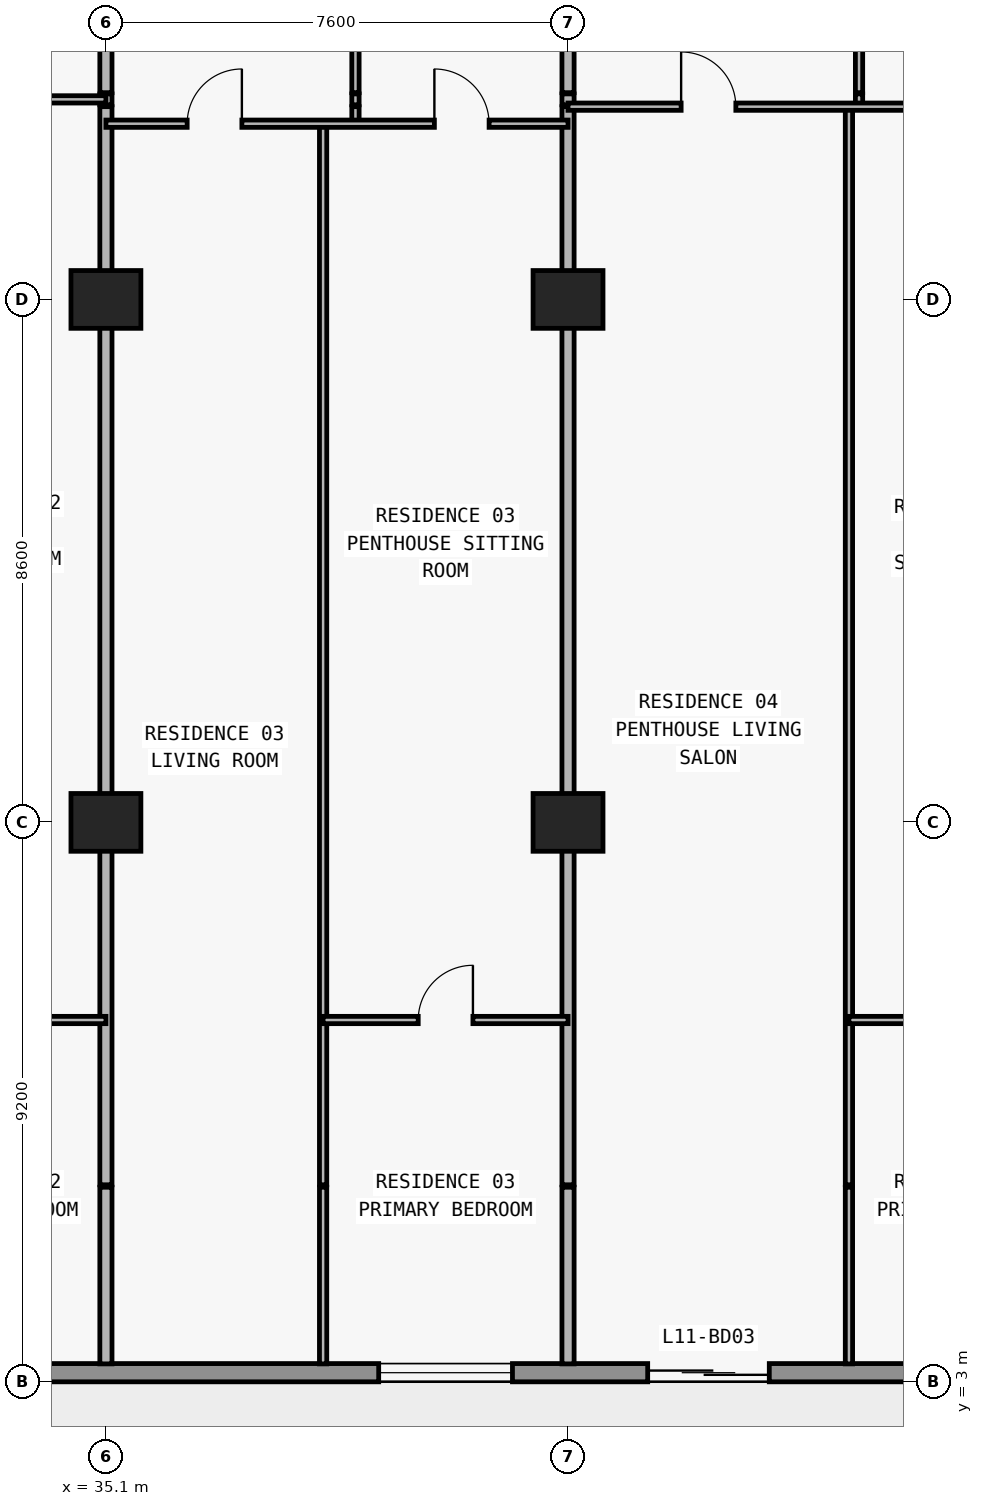
"""IFC4 building model, lengths in metres.
Left out: names, types, materials, properties, quantities, classifications, styles, units other than length and angle.
Written with IfcOpenShell. Run it as: python <this file> out.ifc"""

import sys

from ifc_helpers import new_model, si_unit, direction, frame, frame_2d, origin, origin_2d, place, context, subcontext, project, spatial, rectangle, extrude, element, fill, save


model = new_model("IFC4")
c1 = context("Model", 3, precision=1e-05, world=origin(), true_north=direction((0.0, 1.0)))
c2 = subcontext(c1, "Body", "Model", "MODEL_VIEW")
j1 = project(units=[si_unit("LENGTHUNIT", "METRE"), si_unit("PLANEANGLEUNIT", "RADIAN")], contexts=[c1])
p1 = place(None, origin())
s1 = spatial("IfcSite", under=j1, at=p1, CompositionType="ELEMENT")
p2 = place(p1, origin())
s2 = spatial("IfcBuilding", under=s1, at=p2, CompositionType="ELEMENT")
p3 = place(p2, frame((0.0, 0.0, 46.5)))
s3 = spatial("IfcBuildingStorey", under=s2, at=p3, CompositionType="ELEMENT", Elevation=46.5)
for number, where, z_axis, x_axis in (
    (1, (35.1, 12.2, 0.0), (0.0, 0.0, 1.0), (1.0, 0.0, 0.0)),
    (2, (42.7, 12.2, 0.0), (0.0, 0.0, 1.0), (1.0, 0.0, 0.0)),
    (3, (35.1, 20.8, 0.0), (0.0, 0.0, 1.0), (1.0, 0.0, 0.0)),
    (4, (42.7, 20.8, 0.0), (0.0, 0.0, 1.0), (1.0, 0.0, 0.0)),
):
    element("IfcColumn", number, at=place(p3, frame(where, z_axis=z_axis, x_axis=x_axis)), inside=s3, PredefinedType="COLUMN", context=c2, shape_type="SweptSolid", body=[
        extrude(rectangle(XDim=1.15, YDim=0.95, at=origin_2d()), origin(), (0.0, 0.0, 1.0), 3.05),
    ])
p4 = place(p3, frame((72.7, 3.15, 0.0), z_axis=(0.0, 0.0, 1.0), x_axis=(-1.0, 0.0, 0.0)))
e5 = element("IfcWall", 5, at=p4, inside=s3, PredefinedType="STANDARD", context=c2, shape_type="SweptSolid", body=[
    extrude(rectangle(XDim=67.6, YDim=0.3, at=frame_2d((33.8, 0.0))), origin(), (0.0, 0.0, 1.0), 3.05),
])
p5 = place(p4, frame((59.89, 0.0, 0.0)))
e6 = element("IfcOpeningElement", 6, at=p5, cuts=e5, PredefinedType="OPENING", context=c2, shape_type="SweptSolid", body=[
    extrude(rectangle(XDim=2.0, YDim=2.3, at=frame_2d((1.0, 1.15))), frame((0.0, 0.16, 0.0), z_axis=(0.0, -1.0, 0.0), x_axis=(1.0, 0.0, 0.0)), (0.0, 0.0, 1.0), 0.32),
])
p6 = place(p4, frame((55.21, 0.0, 0.65)))
e7 = element("IfcOpeningElement", 7, at=p6, cuts=e5, PredefinedType="OPENING", context=c2, shape_type="SweptSolid", body=[
    extrude(rectangle(XDim=2.6, YDim=1.85, at=frame_2d((1.3, 0.925))), frame((0.0, 0.16, 0.0), z_axis=(0.0, -1.0, 0.0), x_axis=(1.0, 0.0, 0.0)), (0.0, 0.0, 1.0), 0.32),
])
p7 = place(p4, frame((49.1, 0.0, 0.85)))
e8 = element("IfcOpeningElement", 8, at=p7, cuts=e5, PredefinedType="OPENING", context=c2, shape_type="SweptSolid", body=[
    extrude(rectangle(XDim=2.2, YDim=1.55, at=frame_2d((1.1, 0.775))), frame((0.0, 0.16, 0.0), z_axis=(0.0, -1.0, 0.0), x_axis=(1.0, 0.0, 0.0)), (0.0, 0.0, 1.0), 0.32),
])
p8 = place(p4, frame((42.69, 0.0, 0.0)))
e9 = element("IfcOpeningElement", 9, at=p8, cuts=e5, PredefinedType="OPENING", context=c2, shape_type="SweptSolid", body=[
    extrude(rectangle(XDim=2.0, YDim=2.3, at=frame_2d((1.0, 1.15))), frame((0.0, 0.16, 0.0), z_axis=(0.0, -1.0, 0.0), x_axis=(1.0, 0.0, 0.0)), (0.0, 0.0, 1.0), 0.32),
])
p9 = place(p4, frame((38.59, 0.0, 0.85)))
e10 = element("IfcOpeningElement", 10, at=p9, cuts=e5, PredefinedType="OPENING", context=c2, shape_type="SweptSolid", body=[
    extrude(rectangle(XDim=1.8, YDim=1.55, at=frame_2d((0.9, 0.775))), frame((0.0, 0.16, 0.0), z_axis=(0.0, -1.0, 0.0), x_axis=(1.0, 0.0, 0.0)), (0.0, 0.0, 1.0), 0.32),
])
p10 = place(p4, frame((30.914, 0.0, 0.85)))
e11 = element("IfcOpeningElement", 11, at=p10, cuts=e5, PredefinedType="OPENING", context=c2, shape_type="SweptSolid", body=[
    extrude(rectangle(XDim=2.2, YDim=1.55, at=frame_2d((1.1, 0.775))), frame((0.0, 0.16, 0.0), z_axis=(0.0, -1.0, 0.0), x_axis=(1.0, 0.0, 0.0)), (0.0, 0.0, 1.0), 0.32),
])
p11 = place(p4, frame((26.69, 0.0, 0.0)))
e12 = element("IfcOpeningElement", 12, at=p11, cuts=e5, PredefinedType="OPENING", context=c2, shape_type="SweptSolid", body=[
    extrude(rectangle(XDim=2.0, YDim=2.3, at=frame_2d((1.0, 1.15))), frame((0.0, 0.16, 0.0), z_axis=(0.0, -1.0, 0.0), x_axis=(1.0, 0.0, 0.0)), (0.0, 0.0, 1.0), 0.32),
])
p12 = place(p4, frame((22.59, 0.0, 0.85)))
e13 = element("IfcOpeningElement", 13, at=p12, cuts=e5, PredefinedType="OPENING", context=c2, shape_type="SweptSolid", body=[
    extrude(rectangle(XDim=1.8, YDim=1.55, at=frame_2d((0.9, 0.775))), frame((0.0, 0.16, 0.0), z_axis=(0.0, -1.0, 0.0), x_axis=(1.0, 0.0, 0.0)), (0.0, 0.0, 1.0), 0.32),
])
p13 = place(p4, frame((18.69, 0.0, 0.0)))
e14 = element("IfcOpeningElement", 14, at=p13, cuts=e5, PredefinedType="OPENING", context=c2, shape_type="SweptSolid", body=[
    extrude(rectangle(XDim=2.0, YDim=2.3, at=frame_2d((1.0, 1.15))), frame((0.0, 0.16, 0.0), z_axis=(0.0, -1.0, 0.0), x_axis=(1.0, 0.0, 0.0)), (0.0, 0.0, 1.0), 0.32),
])
p14 = place(p4, frame((14.01, 0.0, 0.65)))
e15 = element("IfcOpeningElement", 15, at=p14, cuts=e5, PredefinedType="OPENING", context=c2, shape_type="SweptSolid", body=[
    extrude(rectangle(XDim=2.6, YDim=1.85, at=frame_2d((1.3, 0.925))), frame((0.0, 0.16, 0.0), z_axis=(0.0, -1.0, 0.0), x_axis=(1.0, 0.0, 0.0)), (0.0, 0.0, 1.0), 0.32),
])
p15 = place(p4, frame((7.9, 0.0, 0.85)))
e16 = element("IfcOpeningElement", 16, at=p15, cuts=e5, PredefinedType="OPENING", context=c2, shape_type="SweptSolid", body=[
    extrude(rectangle(XDim=2.2, YDim=1.55, at=frame_2d((1.1, 0.775))), frame((0.0, 0.16, 0.0), z_axis=(0.0, -1.0, 0.0), x_axis=(1.0, 0.0, 0.0)), (0.0, 0.0, 1.0), 0.32),
])
p16 = place(p3, frame((35.1, 3.295, 0.0), z_axis=(0.0, 0.0, 1.0), x_axis=(0.0, 1.0, 0.0)))
e17 = element("IfcWall", 17, at=p16, inside=s3, PredefinedType="PARTITIONING", context=c2, shape_type="SweptSolid", body=[
    extrude(rectangle(XDim=2.905, YDim=0.2, at=frame_2d((1.453, 0.0))), origin(), (0.0, 0.0, 1.0), 3.05),
])
p17 = place(p3, frame((35.1, 6.24, 0.0), z_axis=(0.0, 0.0, 1.0), x_axis=(0.0, 1.0, 0.0)))
e18 = element("IfcWall", 18, at=p17, inside=s3, PredefinedType="PARTITIONING", context=c2, shape_type="SweptSolid", body=[
    extrude(rectangle(XDim=17.73, YDim=0.2, at=frame_2d((8.865, 0.0))), origin(), (0.0, 0.0, 1.0), 2.11),
])
p18 = place(p3, frame((35.1, 24.0, 0.0), z_axis=(0.0, 0.0, 1.0), x_axis=(0.0, 1.0, 0.0)))
e19 = element("IfcWall", 19, at=p18, inside=s3, PredefinedType="PARTITIONING", context=c2, shape_type="SweptSolid", body=[
    extrude(rectangle(XDim=0.18, YDim=0.2, at=frame_2d((0.09, 0.0))), origin(), (0.0, 0.0, 1.0), 2.11),
])
p19 = place(p3, frame((35.1, 24.2, 0.0), z_axis=(0.0, 0.0, 1.0), x_axis=(0.0, 1.0, 0.0)))
e20 = element("IfcWall", 20, at=p19, inside=s3, PredefinedType="PARTITIONING", context=c2, shape_type="SweptSolid", body=[
    extrude(rectangle(XDim=4.38, YDim=0.2, at=frame_2d((2.19, 0.0))), origin(), (0.0, 0.0, 1.0), 2.11),
])
p20 = place(p3, frame((38.672, 3.295, 0.0), z_axis=(0.0, 0.0, 1.0), x_axis=(0.0, 1.0, 0.0)))
e21 = element("IfcWall", 21, at=p20, inside=s3, PredefinedType="PARTITIONING", context=c2, shape_type="SweptSolid", body=[
    extrude(rectangle(XDim=2.905, YDim=0.12, at=frame_2d((1.453, 0.0))), origin(), (0.0, 0.0, 1.0), 3.05),
])
p21 = place(p3, frame((38.672, 6.24, 0.0), z_axis=(0.0, 0.0, 1.0), x_axis=(0.0, 1.0, 0.0)))
e22 = element("IfcWall", 22, at=p21, inside=s3, PredefinedType="PARTITIONING", context=c2, shape_type="SweptSolid", body=[
    extrude(rectangle(XDim=17.45, YDim=0.12, at=frame_2d((8.725, 0.0))), origin(), (0.0, 0.0, 1.0), 3.05),
])
p22 = place(p3, frame((39.204, 23.69, 0.0), z_axis=(0.0, 0.0, 1.0), x_axis=(0.0, 1.0, 0.0)))
e23 = element("IfcWall", 23, at=p22, inside=s3, PredefinedType="PARTITIONING", context=c2, shape_type="SweptSolid", body=[
    extrude(rectangle(XDim=0.28, YDim=0.12, at=frame_2d((0.14, 0.0))), origin(), (0.0, 0.0, 1.0), 3.05),
])
p23 = place(p3, frame((39.204, 24.0, 0.0), z_axis=(0.0, 0.0, 1.0), x_axis=(0.0, 1.0, 0.0)))
e24 = element("IfcWall", 24, at=p23, inside=s3, PredefinedType="PARTITIONING", context=c2, shape_type="SweptSolid", body=[
    extrude(rectangle(XDim=0.18, YDim=0.12, at=frame_2d((0.09, 0.0))), origin(), (0.0, 0.0, 1.0), 3.05),
])
p24 = place(p3, frame((39.204, 24.2, 0.0), z_axis=(0.0, 0.0, 1.0), x_axis=(0.0, 1.0, 0.0)))
e25 = element("IfcWall", 25, at=p24, inside=s3, PredefinedType="PARTITIONING", context=c2, shape_type="SweptSolid", body=[
    extrude(rectangle(XDim=4.38, YDim=0.12, at=frame_2d((2.19, 0.0))), origin(), (0.0, 0.0, 1.0), 3.05),
])
p25 = place(p24, frame((1.74, 0.0, 0.0)))
e26 = element("IfcOpeningElement", 26, at=p25, cuts=e25, PredefinedType="OPENING", context=c2, shape_type="SweptSolid", body=[
    extrude(rectangle(XDim=0.9, YDim=2.15, at=frame_2d((0.45, 1.075))), frame((0.0, 0.07, 0.0), z_axis=(0.0, -1.0, 0.0), x_axis=(1.0, 0.0, 0.0)), (0.0, 0.0, 1.0), 0.14),
])
p26 = place(p3, frame((42.7, 3.295, 0.0), z_axis=(0.0, 0.0, 1.0), x_axis=(0.0, 1.0, 0.0)))
e27 = element("IfcWall", 27, at=p26, inside=s3, PredefinedType="PARTITIONING", context=c2, shape_type="SweptSolid", body=[
    extrude(rectangle(XDim=2.905, YDim=0.2, at=frame_2d((1.453, 0.0))), origin(), (0.0, 0.0, 1.0), 3.05),
])
p27 = place(p3, frame((42.7, 6.24, 0.0), z_axis=(0.0, 0.0, 1.0), x_axis=(0.0, 1.0, 0.0)))
e28 = element("IfcWall", 28, at=p27, inside=s3, PredefinedType="PARTITIONING", context=c2, shape_type="SweptSolid", body=[
    extrude(rectangle(XDim=17.73, YDim=0.2, at=frame_2d((8.865, 0.0))), origin(), (0.0, 0.0, 1.0), 2.11),
])
p28 = place(p3, frame((42.7, 24.0, 0.0), z_axis=(0.0, 0.0, 1.0), x_axis=(0.0, 1.0, 0.0)))
e29 = element("IfcWall", 29, at=p28, inside=s3, PredefinedType="PARTITIONING", context=c2, shape_type="SweptSolid", body=[
    extrude(rectangle(XDim=0.18, YDim=0.2, at=frame_2d((0.09, 0.0))), origin(), (0.0, 0.0, 1.0), 2.11),
])
p29 = place(p3, frame((42.7, 24.2, 0.0), z_axis=(0.0, 0.0, 1.0), x_axis=(0.0, 1.0, 0.0)))
e30 = element("IfcWall", 30, at=p29, inside=s3, PredefinedType="PARTITIONING", context=c2, shape_type="SweptSolid", body=[
    extrude(rectangle(XDim=4.38, YDim=0.2, at=frame_2d((2.19, 0.0))), origin(), (0.0, 0.0, 1.0), 2.11),
])
p30 = place(p3, frame((47.32, 3.295, 0.0), z_axis=(0.0, 0.0, 1.0), x_axis=(0.0, 1.0, 0.0)))
e31 = element("IfcWall", 31, at=p30, inside=s3, PredefinedType="PARTITIONING", context=c2, shape_type="SweptSolid", body=[
    extrude(rectangle(XDim=2.905, YDim=0.12, at=frame_2d((1.453, 0.0))), origin(), (0.0, 0.0, 1.0), 3.05),
])
p31 = place(p3, frame((47.32, 6.24, 0.0), z_axis=(0.0, 0.0, 1.0), x_axis=(0.0, 1.0, 0.0)))
e32 = element("IfcWall", 32, at=p31, inside=s3, PredefinedType="PARTITIONING", context=c2, shape_type="SweptSolid", body=[
    extrude(rectangle(XDim=17.73, YDim=0.12, at=frame_2d((8.865, 0.0))), origin(), (0.0, 0.0, 1.0), 3.05),
])
p32 = place(p3, frame((47.486, 24.0, 0.0), z_axis=(0.0, 0.0, 1.0), x_axis=(0.0, 1.0, 0.0)))
e33 = element("IfcWall", 33, at=p32, inside=s3, PredefinedType="PARTITIONING", context=c2, shape_type="SweptSolid", body=[
    extrude(rectangle(XDim=0.18, YDim=0.12, at=frame_2d((0.09, 0.0))), origin(), (0.0, 0.0, 1.0), 3.05),
])
p33 = place(p3, frame((47.486, 24.2, 0.0), z_axis=(0.0, 0.0, 1.0), x_axis=(0.0, 1.0, 0.0)))
e34 = element("IfcWall", 34, at=p33, inside=s3, PredefinedType="PARTITIONING", context=c2, shape_type="SweptSolid", body=[
    extrude(rectangle(XDim=4.38, YDim=0.12, at=frame_2d((2.19, 0.0))), origin(), (0.0, 0.0, 1.0), 3.05),
])
p34 = place(p33, frame((1.74, 0.0, 0.0)))
e35 = element("IfcOpeningElement", 35, at=p34, cuts=e34, PredefinedType="OPENING", context=c2, shape_type="SweptSolid", body=[
    extrude(rectangle(XDim=0.9, YDim=2.15, at=frame_2d((0.45, 1.075))), frame((0.0, 0.07, 0.0), z_axis=(0.0, -1.0, 0.0), x_axis=(1.0, 0.0, 0.0)), (0.0, 0.0, 1.0), 0.14),
])
p35 = place(p3, frame((31.4, 8.95, 0.0), z_axis=(0.0, 0.0, 1.0), x_axis=(1.0, 0.0, 0.0)))
e36 = element("IfcWall", 36, at=p35, inside=s3, PredefinedType="PARTITIONING", context=c2, shape_type="SweptSolid", body=[
    extrude(rectangle(XDim=3.7, YDim=0.12, at=frame_2d((1.85, 0.0))), origin(), (0.0, 0.0, 1.0), 3.05),
])
p36 = place(p35, frame((1.4, 0.0, 0.0)))
e37 = element("IfcOpeningElement", 37, at=p36, cuts=e36, PredefinedType="OPENING", context=c2, shape_type="SweptSolid", body=[
    extrude(rectangle(XDim=0.9, YDim=2.15, at=frame_2d((0.45, 1.075))), frame((0.0, 0.07, 0.0), z_axis=(0.0, -1.0, 0.0), x_axis=(1.0, 0.0, 0.0)), (0.0, 0.0, 1.0), 0.14),
])
p37 = place(p3, frame((38.672, 8.95, 0.0), z_axis=(0.0, 0.0, 1.0), x_axis=(1.0, 0.0, 0.0)))
e38 = element("IfcWall", 38, at=p37, inside=s3, PredefinedType="PARTITIONING", context=c2, shape_type="SweptSolid", body=[
    extrude(rectangle(XDim=4.028, YDim=0.12, at=frame_2d((2.014, 0.0))), origin(), (0.0, 0.0, 1.0), 3.05),
])
p38 = place(p37, frame((1.564, 0.0, 0.0)))
e39 = element("IfcOpeningElement", 39, at=p38, cuts=e38, PredefinedType="OPENING", context=c2, shape_type="SweptSolid", body=[
    extrude(rectangle(XDim=0.9, YDim=2.15, at=frame_2d((0.45, 1.075))), frame((0.0, 0.07, 0.0), z_axis=(0.0, -1.0, 0.0), x_axis=(1.0, 0.0, 0.0)), (0.0, 0.0, 1.0), 0.14),
])
p39 = place(p3, frame((47.32, 8.95, 0.0), z_axis=(0.0, 0.0, 1.0), x_axis=(1.0, 0.0, 0.0)))
e40 = element("IfcWall", 40, at=p39, inside=s3, PredefinedType="PARTITIONING", context=c2, shape_type="SweptSolid", body=[
    extrude(rectangle(XDim=3.78, YDim=0.12, at=frame_2d((1.89, 0.0))), origin(), (0.0, 0.0, 1.0), 3.05),
])
p40 = place(p39, frame((1.44, 0.0, 0.0)))
e41 = element("IfcOpeningElement", 41, at=p40, cuts=e40, PredefinedType="OPENING", context=c2, shape_type="SweptSolid", body=[
    extrude(rectangle(XDim=0.9, YDim=2.15, at=frame_2d((0.45, 1.075))), frame((0.0, 0.07, 0.0), z_axis=(0.0, -1.0, 0.0), x_axis=(1.0, 0.0, 0.0)), (0.0, 0.0, 1.0), 0.14),
])
p41 = place(p3, frame((35.1, 23.69, 0.0), z_axis=(0.0, 0.0, 1.0), x_axis=(1.0, 0.0, 0.0)))
e42 = element("IfcWall", 42, at=p41, inside=s3, PredefinedType="PARTITIONING", context=c2, shape_type="SweptSolid", body=[
    extrude(rectangle(XDim=7.6, YDim=0.12, at=frame_2d((3.8, 0.0))), origin(), (0.0, 0.0, 1.0), 3.05),
])
p42 = place(p41, frame((1.336, 0.0, 0.0)))
e43 = element("IfcOpeningElement", 43, at=p42, cuts=e42, PredefinedType="OPENING", context=c2, shape_type="SweptSolid", body=[
    extrude(rectangle(XDim=0.9, YDim=2.15, at=frame_2d((0.45, 1.075))), frame((0.0, 0.07, 0.0), z_axis=(0.0, -1.0, 0.0), x_axis=(1.0, 0.0, 0.0)), (0.0, 0.0, 1.0), 0.14),
])
p43 = place(p41, frame((5.402, 0.0, 0.0)))
e44 = element("IfcOpeningElement", 44, at=p43, cuts=e42, PredefinedType="OPENING", context=c2, shape_type="SweptSolid", body=[
    extrude(rectangle(XDim=0.9, YDim=2.15, at=frame_2d((0.45, 1.075))), frame((0.0, 0.07, 0.0), z_axis=(0.0, -1.0, 0.0), x_axis=(1.0, 0.0, 0.0)), (0.0, 0.0, 1.0), 0.14),
])
p44 = place(p3, frame((42.7, 23.97, 0.0), z_axis=(0.0, 0.0, 1.0), x_axis=(1.0, 0.0, 0.0)))
e45 = element("IfcWall", 45, at=p44, inside=s3, PredefinedType="PARTITIONING", context=c2, shape_type="SweptSolid", body=[
    extrude(rectangle(XDim=8.13, YDim=0.12, at=frame_2d((4.065, 0.0))), origin(), (0.0, 0.0, 1.0), 3.05),
])
p45 = place(p44, frame((1.86, 0.0, 0.0)))
e46 = element("IfcOpeningElement", 46, at=p45, cuts=e45, PredefinedType="OPENING", context=c2, shape_type="SweptSolid", body=[
    extrude(rectangle(XDim=0.9, YDim=2.15, at=frame_2d((0.45, 1.075))), frame((0.0, 0.07, 0.0), z_axis=(0.0, -1.0, 0.0), x_axis=(1.0, 0.0, 0.0)), (0.0, 0.0, 1.0), 0.14),
])
p46 = place(p44, frame((6.008, 0.0, 0.0)))
e47 = element("IfcOpeningElement", 47, at=p46, cuts=e45, PredefinedType="OPENING", context=c2, shape_type="SweptSolid", body=[
    extrude(rectangle(XDim=0.9, YDim=2.15, at=frame_2d((0.45, 1.075))), frame((0.0, 0.07, 0.0), z_axis=(0.0, -1.0, 0.0), x_axis=(1.0, 0.0, 0.0)), (0.0, 0.0, 1.0), 0.14),
])
p47 = place(p3, frame((31.4, 24.09, 0.0), z_axis=(0.0, 0.0, 1.0), x_axis=(1.0, 0.0, 0.0)))
e48 = element("IfcWall", 48, at=p47, inside=s3, PredefinedType="PARTITIONING", context=c2, shape_type="SweptSolid", body=[
    extrude(rectangle(XDim=3.7, YDim=0.12, at=frame_2d((1.85, 0.0))), origin(), (0.0, 0.0, 1.0), 3.05),
])
p48 = place(p47, frame((1.4, 0.0, 0.0)))
e49 = element("IfcOpeningElement", 49, at=p48, cuts=e48, PredefinedType="OPENING", context=c2, shape_type="SweptSolid", body=[
    extrude(rectangle(XDim=0.9, YDim=2.15, at=frame_2d((0.45, 1.075))), frame((0.0, 0.07, 0.0), z_axis=(0.0, -1.0, 0.0), x_axis=(1.0, 0.0, 0.0)), (0.0, 0.0, 1.0), 0.14),
])
p49 = place(p10, origin())
e50 = element("IfcWindow", 50, at=p49, inside=s3, PartitioningType="SINGLE_PANEL", PredefinedType="WINDOW", context=c2, shape_type="SweptSolid", body=[
    extrude(rectangle(XDim=2.2, YDim=1.55, at=frame_2d((1.1, 0.775))), frame((0.0, 0.03, 0.0), z_axis=(0.0, -1.0, 0.0), x_axis=(1.0, 0.0, 0.0)), (0.0, 0.0, 1.0), 0.06),
])
fill(e11, e50)
p50 = place(p11, origin())
e51 = element("IfcDoor", 51, at=p50, inside=s3, OperationType="DOUBLE_DOOR_SLIDING", PredefinedType="DOOR", context=c2, shape_type="SweptSolid", body=[
    extrude(rectangle(XDim=2.0, YDim=2.3, at=frame_2d((1.0, 1.15))), frame((0.0, 0.025, 0.0), z_axis=(0.0, -1.0, 0.0), x_axis=(1.0, 0.0, 0.0)), (0.0, 0.0, 1.0), 0.05),
])
fill(e12, e51)
p51 = place(p42, origin())
e52 = element("IfcDoor", 52, at=p51, inside=s3, OperationType="SINGLE_SWING_RIGHT", PredefinedType="DOOR", context=c2, shape_type="SweptSolid", body=[
    extrude(rectangle(XDim=0.9, YDim=2.15, at=frame_2d((0.45, 1.075))), frame((0.0, 0.025, 0.0), z_axis=(0.0, -1.0, 0.0), x_axis=(1.0, 0.0, 0.0)), (0.0, 0.0, 1.0), 0.05),
])
fill(e43, e52)
p52 = place(p43, origin())
e53 = element("IfcDoor", 53, at=p52, inside=s3, OperationType="SINGLE_SWING_LEFT", PredefinedType="DOOR", context=c2, shape_type="SweptSolid", body=[
    extrude(rectangle(XDim=0.9, YDim=2.15, at=frame_2d((0.45, 1.075))), frame((0.0, 0.025, 0.0), z_axis=(0.0, -1.0, 0.0), x_axis=(1.0, 0.0, 0.0)), (0.0, 0.0, 1.0), 0.05),
])
fill(e44, e53)
p53 = place(p38, origin())
e54 = element("IfcDoor", 54, at=p53, inside=s3, OperationType="SINGLE_SWING_RIGHT", PredefinedType="DOOR", context=c2, shape_type="SweptSolid", body=[
    extrude(rectangle(XDim=0.9, YDim=2.15, at=frame_2d((0.45, 1.075))), frame((0.0, 0.025, 0.0), z_axis=(0.0, -1.0, 0.0), x_axis=(1.0, 0.0, 0.0)), (0.0, 0.0, 1.0), 0.05),
])
fill(e39, e54)
p54 = place(p45, origin())
e55 = element("IfcDoor", 55, at=p54, inside=s3, OperationType="SINGLE_SWING_LEFT", PredefinedType="DOOR", context=c2, shape_type="SweptSolid", body=[
    extrude(rectangle(XDim=0.9, YDim=2.15, at=frame_2d((0.45, 1.075))), frame((0.0, 0.025, 0.0), z_axis=(0.0, -1.0, 0.0), x_axis=(1.0, 0.0, 0.0)), (0.0, 0.0, 1.0), 0.05),
])
fill(e46, e55)
save(model, sys.argv[1])
